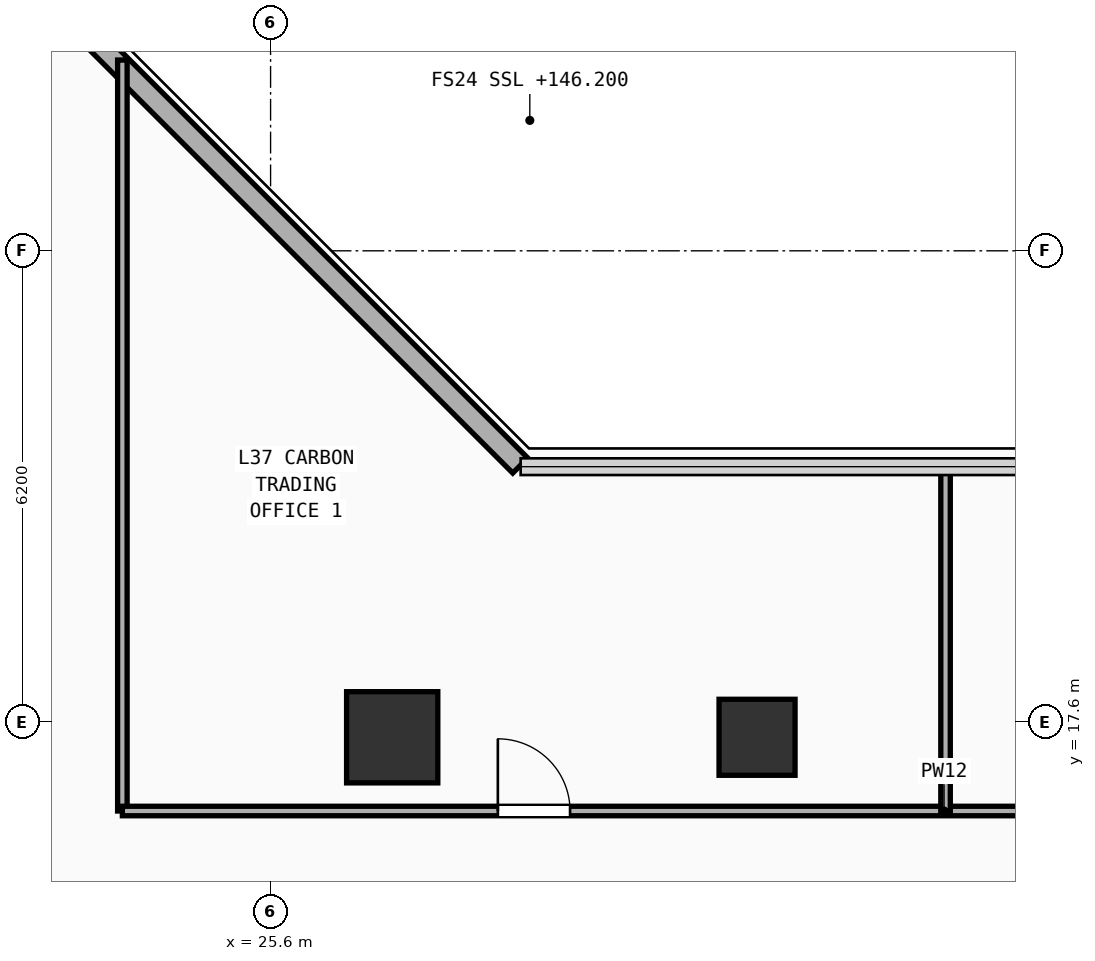
"""IFC4 building model, lengths in metres.
Left out: names, types, materials, properties, quantities, classifications, styles, units other than length and angle.
Written with IfcOpenShell. Run it as: python <this file> out.ifc"""

import sys

from ifc_helpers import new_model, si_unit, direction, frame, frame_2d, origin, origin_2d, place, context, subcontext, project, spatial, rectangle, extrude, element, fill, save


model = new_model("IFC4")
c1 = context("Model", 3, precision=1e-05, world=origin(), true_north=direction((0.0, 1.0)))
c2 = subcontext(c1, "Body", "Model", "MODEL_VIEW")
j1 = project(units=[si_unit("LENGTHUNIT", "METRE"), si_unit("PLANEANGLEUNIT", "RADIAN")], contexts=[c1])
p1 = place(None, origin())
s1 = spatial("IfcSite", under=j1, at=p1, CompositionType="ELEMENT")
p2 = place(p1, origin())
s2 = spatial("IfcBuilding", under=s1, at=p2, CompositionType="ELEMENT")
p3 = place(p2, frame((0.0, 0.0, 146.2)))
s3 = spatial("IfcBuildingStorey", under=s2, at=p3, CompositionType="ELEMENT", Elevation=146.2)
p4 = place(p3, frame((27.2, 17.4, 0.0), z_axis=(0.0, 0.0, 1.0), x_axis=(1.0, 0.0, 0.0)))
e1 = element("IfcColumn", 1, at=p4, inside=s3, PredefinedType="COLUMN", context=c2, shape_type="SweptSolid", body=[
    extrude(rectangle(XDim=1.2, YDim=1.2, at=origin_2d()), origin(), (0.0, 0.0, 1.0), 3.56),
])
p5 = place(p3, frame((32.0, 17.4, 0.0), z_axis=(0.0, 0.0, 1.0), x_axis=(1.0, 0.0, 0.0)))
e2 = element("IfcColumn", 2, at=p5, inside=s3, PredefinedType="COLUMN", context=c2, shape_type="SweptSolid", body=[
    extrude(rectangle(XDim=1.0, YDim=1.0, at=origin_2d()), origin(), (0.0, 0.0, 1.0), 3.56),
])
p6 = place(p3, frame((28.885, 20.975, 0.0), z_axis=(0.0, 0.0, 1.0), x_axis=(-0.707106781187, 0.707106781187, 0.0)))
e3 = element("IfcWall", 3, at=p6, inside=s3, PredefinedType="SOLIDWALL", context=c2, shape_type="SweptSolid", body=[
    extrude(rectangle(XDim=9.207, YDim=0.28, at=frame_2d((4.603, 0.0))), origin(), (0.0, 0.0, 1.0), 3.56),
])
p7 = place(p3, frame((23.65, 16.43, 0.0), z_axis=(0.0, 0.0, 1.0), x_axis=(0.0, 1.0, 0.0)))
e4 = element("IfcWall", 4, at=p7, inside=s3, PredefinedType="PARTITIONING", context=c2, shape_type="SweptSolid", body=[
    extrude(rectangle(XDim=9.88, YDim=0.125, at=frame_2d((4.94, 0.0))), origin(), (0.0, 0.0, 1.0), 3.56),
])
p8 = place(p3, frame((23.65, 16.43, 0.0), z_axis=(0.0, 0.0, 1.0), x_axis=(1.0, 0.0, 0.0)))
e5 = element("IfcWall", 5, at=p8, inside=s3, PredefinedType="PARTITIONING", context=c2, shape_type="SweptSolid", body=[
    extrude(rectangle(XDim=23.55, YDim=0.125, at=frame_2d((11.775, 0.0))), origin(), (0.0, 0.0, 1.0), 3.56),
])
p9 = place(p8, frame((4.94, 0.0, 0.0)))
e6 = element("IfcOpeningElement", 6, at=p9, cuts=e5, PredefinedType="OPENING", context=c2, shape_type="SweptSolid", body=[
    extrude(rectangle(XDim=0.95, YDim=2.15, at=frame_2d((0.475, 1.075))), frame((0.0, 0.073, 0.0), z_axis=(0.0, -1.0, 0.0), x_axis=(1.0, 0.0, 0.0)), (0.0, 0.0, 1.0), 0.145),
])
p10 = place(p8, frame((15.73, 0.0, 0.0)))
e7 = element("IfcOpeningElement", 7, at=p10, cuts=e5, PredefinedType="OPENING", context=c2, shape_type="SweptSolid", body=[
    extrude(rectangle(XDim=0.95, YDim=2.15, at=frame_2d((0.475, 1.075))), frame((0.0, 0.073, 0.0), z_axis=(0.0, -1.0, 0.0), x_axis=(1.0, 0.0, 0.0)), (0.0, 0.0, 1.0), 0.145),
])
p11 = place(p3, frame((34.48, 16.43, 0.0), z_axis=(0.0, 0.0, 1.0), x_axis=(0.0, 1.0, 0.0)))
e8 = element("IfcWall", 8, at=p11, inside=s3, PredefinedType="PARTITIONING", context=c2, shape_type="SweptSolid", body=[
    extrude(rectangle(XDim=4.53, YDim=0.125, at=frame_2d((2.265, 0.0))), origin(), (0.0, 0.0, 1.0), 3.56),
])
p12 = place(p9, origin())
e9 = element("IfcDoor", 9, at=p12, inside=s3, OperationType="SINGLE_SWING_LEFT", PredefinedType="DOOR", context=c2, shape_type="SweptSolid", body=[
    extrude(rectangle(XDim=0.95, YDim=2.15, at=frame_2d((0.475, 1.075))), frame((0.0, 0.025, 0.0), z_axis=(0.0, -1.0, 0.0), x_axis=(1.0, 0.0, 0.0)), (0.0, 0.0, 1.0), 0.05),
])
fill(e6, e9)
save(model, sys.argv[1])
